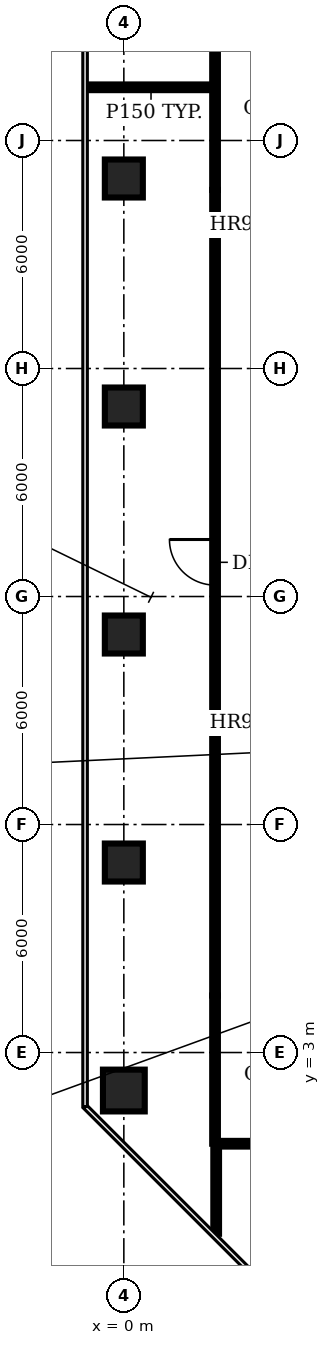
"""IFC4 building model, lengths in metres.
Left out: names, types, materials, properties, quantities, classifications, styles, units other than length and angle.
Written with IfcOpenShell. Run it as: python <this file> out.ifc"""

import sys

from ifc_helpers import new_model, si_unit, direction, frame, frame_2d, origin, origin_2d, place, context, subcontext, project, spatial, rectangle, circle, extrude, element, fill, save


model = new_model("IFC4")
c1 = context("Model", 3, precision=1e-05, world=origin(), true_north=direction((0.0, 1.0)))
c2 = subcontext(c1, "Body", "Model", "MODEL_VIEW")
j1 = project(units=[si_unit("LENGTHUNIT", "METRE"), si_unit("PLANEANGLEUNIT", "RADIAN")], contexts=[c1])
p1 = place(None, origin())
s1 = spatial("IfcSite", under=j1, at=p1, CompositionType="ELEMENT")
p2 = place(p1, origin())
s2 = spatial("IfcBuilding", under=s1, at=p2, CompositionType="ELEMENT")
p3 = place(p2, frame((0.0, 0.0, 20.0)))
s3 = spatial("IfcBuildingStorey", under=s2, at=p3, CompositionType="ELEMENT", Elevation=20.0)
p4 = place(p3, frame((0.0, 2.0, 0.0), z_axis=(0.0, 0.0, 1.0), x_axis=(1.0, 0.0, 0.0)))
e1 = element("IfcColumn", 1, at=p4, inside=s3, PredefinedType="COLUMN", context=c2, shape_type="SweptSolid", body=[
    extrude(circle(Radius=0.55, at=origin_2d()), origin(), (0.0, 0.0, 1.0), 4.15),
])
for number, where, z_axis, x_axis in (
    (2, (0.0, 8.0, 0.0), (0.0, 0.0, 1.0), (1.0, 0.0, 0.0)),
    (3, (0.0, 14.0, 0.0), (0.0, 0.0, 1.0), (1.0, 0.0, 0.0)),
    (4, (0.0, 20.0, 0.0), (0.0, 0.0, 1.0), (1.0, 0.0, 0.0)),
    (5, (0.0, 26.0, 0.0), (0.0, 0.0, 1.0), (1.0, 0.0, 0.0)),
):
    element("IfcColumn", number, at=place(p3, frame(where, z_axis=z_axis, x_axis=x_axis)), inside=s3, PredefinedType="COLUMN", context=c2, shape_type="SweptSolid", body=[
        extrude(rectangle(XDim=1.0, YDim=1.0, at=origin_2d()), origin(), (0.0, 0.0, 1.0), 4.15),
    ])
p5 = place(p3, frame((-0.97, 28.4, 0.0), z_axis=(0.0, 0.0, 1.0), x_axis=(1.0, 0.0, 0.0)))
e6 = element("IfcWall", 6, at=p5, inside=s3, PredefinedType="PARTITIONING", context=c2, shape_type="SweptSolid", body=[
    extrude(rectangle(XDim=3.37, YDim=0.15, at=frame_2d((1.685, 0.0))), origin(), (0.0, 0.0, 1.0), 3.08),
])
p6 = place(p3, frame((2.4, 0.6, 0.0), z_axis=(0.0, 0.0, 1.0), x_axis=(0.0, 1.0, 0.0)))
e7 = element("IfcWall", 7, at=p6, inside=s3, PredefinedType="PARTITIONING", context=c2, shape_type="SweptSolid", body=[
    extrude(rectangle(XDim=3.9, YDim=0.15, at=frame_2d((1.95, 0.0))), origin(), (0.0, 0.0, 1.0), 3.08),
])
p7 = place(p3, frame((2.4, 4.5, 0.0), z_axis=(0.0, 0.0, 1.0), x_axis=(0.0, 1.0, 0.0)))
e8 = element("IfcWall", 8, at=p7, inside=s3, PredefinedType="PARTITIONING", context=c2, shape_type="SweptSolid", body=[
    extrude(rectangle(XDim=21.2, YDim=0.15, at=frame_2d((10.6, 0.0))), origin(), (0.0, 0.0, 1.0), 3.08),
])
p8 = place(p7, frame((10.8, 0.0, 0.0)))
e9 = element("IfcOpeningElement", 9, at=p8, cuts=e8, PredefinedType="OPENING", context=c2, shape_type="SweptSolid", body=[
    extrude(rectangle(XDim=1.2, YDim=2.1, at=frame_2d((0.6, 1.05))), frame((0.0, 0.085, 0.0), z_axis=(0.0, -1.0, 0.0), x_axis=(1.0, 0.0, 0.0)), (0.0, 0.0, 1.0), 0.17),
])
p9 = place(p3, frame((2.4, 25.7, 0.0), z_axis=(0.0, 0.0, 1.0), x_axis=(0.0, 1.0, 0.0)))
e10 = element("IfcWall", 10, at=p9, inside=s3, PredefinedType="PARTITIONING", context=c2, shape_type="SweptSolid", body=[
    extrude(rectangle(XDim=3.9, YDim=0.15, at=frame_2d((1.95, 0.0))), origin(), (0.0, 0.0, 1.0), 3.08),
])
p10 = place(p3, frame((2.43, -1.77, 0.0), z_axis=(0.0, 0.0, 1.0), x_axis=(0.0, 1.0, 0.0)))
e11 = element("IfcWall", 11, at=p10, inside=s3, PredefinedType="PARTITIONING", context=c2, shape_type="SweptSolid", body=[
    extrude(rectangle(XDim=2.37, YDim=0.15, at=frame_2d((1.185, 0.0))), origin(), (0.0, 0.0, 1.0), 3.08),
])
p11 = place(p3, frame((27.6, 0.6, 0.0), z_axis=(0.0, 0.0, 1.0), x_axis=(-1.0, 0.0, 0.0)))
e12 = element("IfcWall", 12, at=p11, inside=s3, PredefinedType="PARTITIONING", context=c2, shape_type="SweptSolid", body=[
    extrude(rectangle(XDim=25.2, YDim=0.15, at=frame_2d((12.6, 0.0))), origin(), (0.0, 0.0, 1.0), 3.08),
])
p12 = place(p11, frame((12.1, 0.0, 0.0)))
e13 = element("IfcOpeningElement", 13, at=p12, cuts=e12, PredefinedType="OPENING", context=c2, shape_type="SweptSolid", body=[
    extrude(rectangle(XDim=1.2, YDim=2.1, at=frame_2d((0.6, 1.05))), frame((0.0, 0.085, 0.0), z_axis=(0.0, -1.0, 0.0), x_axis=(1.0, 0.0, 0.0)), (0.0, 0.0, 1.0), 0.17),
])
p13 = place(p8, origin())
e14 = element("IfcDoor", 14, at=p13, inside=s3, OperationType="SINGLE_SWING_RIGHT", PredefinedType="DOOR", context=c2, shape_type="SweptSolid", body=[
    extrude(rectangle(XDim=1.2, YDim=2.1, at=frame_2d((0.6, 1.05))), frame((0.0, 0.025, 0.0), z_axis=(0.0, -1.0, 0.0), x_axis=(1.0, 0.0, 0.0)), (0.0, 0.0, 1.0), 0.05),
])
fill(e9, e14)
save(model, sys.argv[1])
